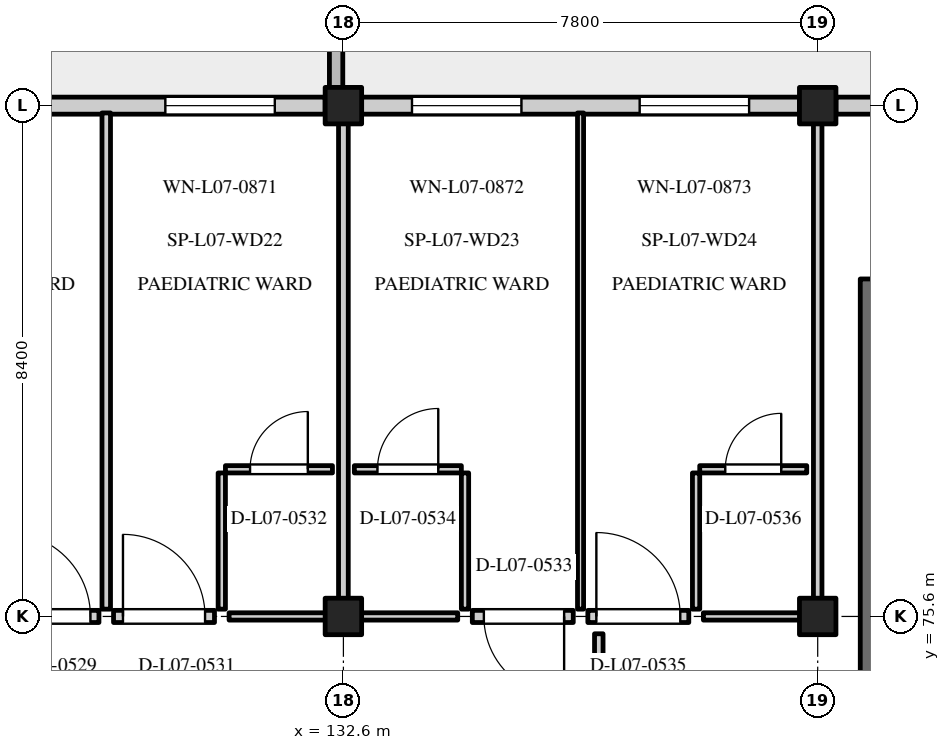
"""IFC4 building model, lengths in metres.
Left out: names, types, materials, properties, quantities, classifications, styles, units other than length and angle.
Written with IfcOpenShell. Run it as: python <this file> out.ifc"""

import sys

from ifc_helpers import new_model, si_unit, direction, frame, frame_2d, origin, origin_2d, place, context, subcontext, project, spatial, rectangle, extrude, element, fill, save


model = new_model("IFC4")
c1 = context("Model", 3, precision=1e-05, world=origin(), true_north=direction((0.0, 1.0)))
c2 = subcontext(c1, "Body", "Model", "MODEL_VIEW")
j1 = project(units=[si_unit("LENGTHUNIT", "METRE"), si_unit("PLANEANGLEUNIT", "RADIAN")], contexts=[c1])
p1 = place(None, origin())
s1 = spatial("IfcSite", under=j1, at=p1, CompositionType="ELEMENT")
p2 = place(p1, origin())
s2 = spatial("IfcBuilding", under=s1, at=p2, CompositionType="ELEMENT")
p3 = place(p2, frame((0.0, 0.0, 29.7)))
s3 = spatial("IfcBuildingStorey", under=s2, at=p3, CompositionType="ELEMENT", Elevation=29.7)
for number, where, z_axis, x_axis in (
    (1, (132.6, 75.6, 0.0), (0.0, 0.0, 1.0), (1.0, 0.0, 0.0)),
    (2, (132.6, 84.0, 0.0), (0.0, 0.0, 1.0), (1.0, 0.0, 0.0)),
    (3, (140.4, 75.6, 0.0), (0.0, 0.0, 1.0), (1.0, 0.0, 0.0)),
    (4, (140.4, 84.0, 0.0), (0.0, 0.0, 1.0), (1.0, 0.0, 0.0)),
):
    element("IfcColumn", number, at=place(p3, frame(where, z_axis=z_axis, x_axis=x_axis)), inside=s3, PredefinedType="COLUMN", context=c2, shape_type="SweptSolid", body=[
        extrude(rectangle(XDim=0.6, YDim=0.6, at=origin_2d()), origin(), (0.0, 0.0, 1.0), 4.2),
    ])
p4 = place(p3, frame((125.1, 84.0, 0.0), z_axis=(0.0, 0.0, 1.0), x_axis=(1.0, 0.0, 0.0)))
e5 = element("IfcWall", 5, at=p4, inside=s3, PredefinedType="STANDARD", context=c2, shape_type="SweptSolid", body=[
    extrude(rectangle(XDim=7.2, YDim=0.28, at=frame_2d((3.6, 0.0))), origin(), (0.0, 0.0, 1.0), 3.25),
])
p5 = place(p4, frame((0.828, 0.0, 0.8)))
e6 = element("IfcOpeningElement", 6, at=p5, cuts=e5, PredefinedType="OPENING", context=c2, shape_type="SweptSolid", body=[
    extrude(rectangle(XDim=1.8, YDim=1.55, at=frame_2d((0.9, 0.775))), frame((0.0, 0.152, 0.0), z_axis=(0.0, -1.0, 0.0), x_axis=(1.0, 0.0, 0.0)), (0.0, 0.0, 1.0), 0.304),
])
p6 = place(p4, frame((4.572, 0.0, 0.8)))
e7 = element("IfcOpeningElement", 7, at=p6, cuts=e5, PredefinedType="OPENING", context=c2, shape_type="SweptSolid", body=[
    extrude(rectangle(XDim=1.8, YDim=1.55, at=frame_2d((0.9, 0.775))), frame((0.0, 0.152, 0.0), z_axis=(0.0, -1.0, 0.0), x_axis=(1.0, 0.0, 0.0)), (0.0, 0.0, 1.0), 0.304),
])
p7 = place(p3, frame((132.9, 84.0, 0.0), z_axis=(0.0, 0.0, 1.0), x_axis=(1.0, 0.0, 0.0)))
e8 = element("IfcWall", 8, at=p7, inside=s3, PredefinedType="STANDARD", context=c2, shape_type="SweptSolid", body=[
    extrude(rectangle(XDim=7.2, YDim=0.28, at=frame_2d((3.6, 0.0))), origin(), (0.0, 0.0, 1.0), 3.25),
])
p8 = place(p7, frame((0.828, 0.0, 0.8)))
e9 = element("IfcOpeningElement", 9, at=p8, cuts=e8, PredefinedType="OPENING", context=c2, shape_type="SweptSolid", body=[
    extrude(rectangle(XDim=1.8, YDim=1.45, at=frame_2d((0.9, 0.725))), frame((0.0, 0.152, 0.0), z_axis=(0.0, -1.0, 0.0), x_axis=(1.0, 0.0, 0.0)), (0.0, 0.0, 1.0), 0.304),
])
p9 = place(p7, frame((4.572, 0.0, 0.8)))
e10 = element("IfcOpeningElement", 10, at=p9, cuts=e8, PredefinedType="OPENING", context=c2, shape_type="SweptSolid", body=[
    extrude(rectangle(XDim=1.8, YDim=1.45, at=frame_2d((0.9, 0.725))), frame((0.0, 0.152, 0.0), z_axis=(0.0, -1.0, 0.0), x_axis=(1.0, 0.0, 0.0)), (0.0, 0.0, 1.0), 0.304),
])
p10 = place(p3, frame((140.7, 84.0, 0.0), z_axis=(0.0, 0.0, 1.0), x_axis=(1.0, 0.0, 0.0)))
e11 = element("IfcWall", 11, at=p10, inside=s3, PredefinedType="STANDARD", context=c2, shape_type="SweptSolid", body=[
    extrude(rectangle(XDim=7.2, YDim=0.28, at=frame_2d((3.6, 0.0))), origin(), (0.0, 0.0, 1.0), 3.25),
])
p11 = place(p10, frame((0.678, 0.0, 0.8)))
e12 = element("IfcOpeningElement", 12, at=p11, cuts=e11, PredefinedType="OPENING", context=c2, shape_type="SweptSolid", body=[
    extrude(rectangle(XDim=2.1, YDim=1.75, at=frame_2d((1.05, 0.875))), frame((0.0, 0.152, 0.0), z_axis=(0.0, -1.0, 0.0), x_axis=(1.0, 0.0, 0.0)), (0.0, 0.0, 1.0), 0.304),
])
p12 = place(p10, frame((4.422, 0.0, 0.8)))
e13 = element("IfcOpeningElement", 13, at=p12, cuts=e11, PredefinedType="OPENING", context=c2, shape_type="SweptSolid", body=[
    extrude(rectangle(XDim=2.1, YDim=1.75, at=frame_2d((1.05, 0.875))), frame((0.0, 0.152, 0.0), z_axis=(0.0, -1.0, 0.0), x_axis=(1.0, 0.0, 0.0)), (0.0, 0.0, 1.0), 0.304),
])
p13 = place(p3, frame((132.48, 84.05, 0.0), z_axis=(0.0, 0.0, 1.0), x_axis=(0.0, 1.0, 0.0)))
e14 = element("IfcWall", 14, at=p13, inside=s3, PredefinedType="PARAPET", context=c2, shape_type="SweptSolid", body=[
    extrude(rectangle(XDim=8.3, YDim=0.22, at=frame_2d((4.15, 0.0))), origin(), (0.0, 0.0, 1.0), 1.15),
])
p14 = place(p3, frame((141.275, 70.65, 0.0), z_axis=(0.0, 0.0, 1.0), x_axis=(0.0, 1.0, 0.0)))
e15 = element("IfcWall", 15, at=p14, inside=s3, PredefinedType="SHEAR", context=c2, shape_type="SweptSolid", body=[
    extrude(rectangle(XDim=10.5, YDim=0.35, at=frame_2d((5.25, 0.0))), origin(), (0.0, 0.0, 1.0), 3.9),
])
p15 = place(p3, frame((128.7, 75.72, 0.0), z_axis=(0.0, 0.0, 1.0), x_axis=(0.0, 1.0, 0.0)))
e16 = element("IfcWall", 16, at=p15, inside=s3, PredefinedType="PARTITIONING", context=c2, shape_type="SweptSolid", body=[
    extrude(rectangle(XDim=8.16, YDim=0.14, at=frame_2d((4.08, 0.0))), origin(), (0.0, 0.0, 1.0), 3.88),
])
p16 = place(p3, frame((126.92, 75.6, 0.0), z_axis=(0.0, 0.0, 1.0), x_axis=(1.0, 0.0, 0.0)))
e17 = element("IfcWall", 17, at=p16, inside=s3, PredefinedType="STANDARD", context=c2, shape_type="SweptSolid", body=[
    extrude(rectangle(XDim=1.66, YDim=0.2, at=frame_2d((0.83, 0.0))), origin(), (0.0, 0.0, 1.0), 3.25),
])
p17 = place(p16, frame((0.14, 0.0, 0.0)))
e18 = element("IfcOpeningElement", 18, at=p17, cuts=e17, PredefinedType="OPENING", context=c2, shape_type="SweptSolid", body=[
    extrude(rectangle(XDim=1.38, YDim=2.2, at=frame_2d((0.69, 1.1))), frame((0.0, 0.112, 0.0), z_axis=(0.0, -1.0, 0.0), x_axis=(1.0, 0.0, 0.0)), (0.0, 0.0, 1.0), 0.224),
])
p18 = place(p3, frame((132.6, 75.72, 0.0), z_axis=(0.0, 0.0, 1.0), x_axis=(0.0, 1.0, 0.0)))
e19 = element("IfcWall", 19, at=p18, inside=s3, PredefinedType="PARTITIONING", context=c2, shape_type="SweptSolid", body=[
    extrude(rectangle(XDim=8.16, YDim=0.16, at=frame_2d((4.08, 0.0))), origin(), (0.0, 0.0, 1.0), 3.25),
])
p19 = place(p3, frame((128.82, 75.6, 0.0), z_axis=(0.0, 0.0, 1.0), x_axis=(1.0, 0.0, 0.0)))
e20 = element("IfcWall", 20, at=p19, inside=s3, PredefinedType="STANDARD", context=c2, shape_type="SweptSolid", body=[
    extrude(rectangle(XDim=1.66, YDim=0.2, at=frame_2d((0.83, 0.0))), origin(), (0.0, 0.0, 1.0), 3.25),
])
p20 = place(p19, frame((0.155, 0.0, 0.0)))
e21 = element("IfcOpeningElement", 21, at=p20, cuts=e20, PredefinedType="OPENING", context=c2, shape_type="SweptSolid", body=[
    extrude(rectangle(XDim=1.35, YDim=2.15, at=frame_2d((0.675, 1.075))), frame((0.0, 0.112, 0.0), z_axis=(0.0, -1.0, 0.0), x_axis=(1.0, 0.0, 0.0)), (0.0, 0.0, 1.0), 0.224),
])
p21 = place(p3, frame((130.72, 75.6, 0.0), z_axis=(0.0, 0.0, 1.0), x_axis=(1.0, 0.0, 0.0)))
e22 = element("IfcWall", 22, at=p21, inside=s3, PredefinedType="PARTITIONING", context=c2, shape_type="SweptSolid", body=[
    extrude(rectangle(XDim=1.76, YDim=0.12, at=frame_2d((0.88, 0.0))), origin(), (0.0, 0.0, 1.0), 3.25),
])
p22 = place(p3, frame((130.6, 75.72, 0.0), z_axis=(0.0, 0.0, 1.0), x_axis=(0.0, 1.0, 0.0)))
e23 = element("IfcWall", 23, at=p22, inside=s3, PredefinedType="PARTITIONING", context=c2, shape_type="SweptSolid", body=[
    extrude(rectangle(XDim=2.24, YDim=0.12, at=frame_2d((1.12, 0.0))), origin(), (0.0, 0.0, 1.0), 3.88),
])
p23 = place(p3, frame((130.66, 78.02, 0.0), z_axis=(0.0, 0.0, 1.0), x_axis=(1.0, 0.0, 0.0)))
e24 = element("IfcWall", 24, at=p23, inside=s3, PredefinedType="PARTITIONING", context=c2, shape_type="SweptSolid", body=[
    extrude(rectangle(XDim=1.76, YDim=0.12, at=frame_2d((0.88, 0.0))), origin(), (0.0, 0.0, 1.0), 3.88),
])
p24 = place(p23, frame((0.405, 0.0, 0.0)))
e25 = element("IfcOpeningElement", 25, at=p24, cuts=e24, PredefinedType="OPENING", context=c2, shape_type="SweptSolid", body=[
    extrude(rectangle(XDim=0.95, YDim=2.1, at=frame_2d((0.475, 1.05))), frame((0.0, 0.072, 0.0), z_axis=(0.0, -1.0, 0.0), x_axis=(1.0, 0.0, 0.0)), (0.0, 0.0, 1.0), 0.144),
])
p25 = place(p3, frame((136.5, 75.72, 0.0), z_axis=(0.0, 0.0, 1.0), x_axis=(0.0, 1.0, 0.0)))
e26 = element("IfcWall", 26, at=p25, inside=s3, PredefinedType="PARTITIONING", context=c2, shape_type="SweptSolid", body=[
    extrude(rectangle(XDim=8.16, YDim=0.1, at=frame_2d((4.08, 0.0))), origin(), (0.0, 0.0, 1.0), 3.88),
])
p26 = place(p3, frame((134.72, 75.6, 0.0), z_axis=(0.0, 0.0, 1.0), x_axis=(1.0, 0.0, 0.0)))
e27 = element("IfcWall", 27, at=p26, inside=s3, PredefinedType="STANDARD", context=c2, shape_type="SweptSolid", body=[
    extrude(rectangle(XDim=1.66, YDim=0.2, at=frame_2d((0.83, 0.0))), origin(), (0.0, 0.0, 1.0), 3.25),
])
p27 = place(p26, frame((0.19, 0.0, 0.0)))
e28 = element("IfcOpeningElement", 28, at=p27, cuts=e27, PredefinedType="OPENING", context=c2, shape_type="SweptSolid", body=[
    extrude(rectangle(XDim=1.32, YDim=2.2, at=frame_2d((0.66, 1.1))), frame((0.0, 0.112, 0.0), z_axis=(0.0, -1.0, 0.0), x_axis=(1.0, 0.0, 0.0)), (0.0, 0.0, 1.0), 0.224),
])
p28 = place(p3, frame((132.72, 75.6, 0.0), z_axis=(0.0, 0.0, 1.0), x_axis=(1.0, 0.0, 0.0)))
e29 = element("IfcWall", 29, at=p28, inside=s3, PredefinedType="PARTITIONING", context=c2, shape_type="SweptSolid", body=[
    extrude(rectangle(XDim=1.76, YDim=0.12, at=frame_2d((0.88, 0.0))), origin(), (0.0, 0.0, 1.0), 3.25),
])
p29 = place(p3, frame((134.6, 75.72, 0.0), z_axis=(0.0, 0.0, 1.0), x_axis=(0.0, 1.0, 0.0)))
e30 = element("IfcWall", 30, at=p29, inside=s3, PredefinedType="PARTITIONING", context=c2, shape_type="SweptSolid", body=[
    extrude(rectangle(XDim=2.24, YDim=0.12, at=frame_2d((1.12, 0.0))), origin(), (0.0, 0.0, 1.0), 3.88),
])
p30 = place(p3, frame((132.78, 78.02, 0.0), z_axis=(0.0, 0.0, 1.0), x_axis=(1.0, 0.0, 0.0)))
e31 = element("IfcWall", 31, at=p30, inside=s3, PredefinedType="PARTITIONING", context=c2, shape_type="SweptSolid", body=[
    extrude(rectangle(XDim=1.76, YDim=0.12, at=frame_2d((0.88, 0.0))), origin(), (0.0, 0.0, 1.0), 3.88),
])
p31 = place(p30, frame((0.38, 0.0, 0.0)))
e32 = element("IfcOpeningElement", 32, at=p31, cuts=e31, PredefinedType="OPENING", context=c2, shape_type="SweptSolid", body=[
    extrude(rectangle(XDim=1.0, YDim=2.1, at=frame_2d((0.5, 1.05))), frame((0.0, 0.072, 0.0), z_axis=(0.0, -1.0, 0.0), x_axis=(1.0, 0.0, 0.0)), (0.0, 0.0, 1.0), 0.144),
])
p32 = place(p3, frame((140.4, 75.72, 0.0), z_axis=(0.0, 0.0, 1.0), x_axis=(0.0, 1.0, 0.0)))
e33 = element("IfcWall", 33, at=p32, inside=s3, PredefinedType="PARTITIONING", context=c2, shape_type="SweptSolid", body=[
    extrude(rectangle(XDim=8.16, YDim=0.14, at=frame_2d((4.08, 0.0))), origin(), (0.0, 0.0, 1.0), 3.88),
])
p33 = place(p3, frame((136.62, 75.6, 0.0), z_axis=(0.0, 0.0, 1.0), x_axis=(1.0, 0.0, 0.0)))
e34 = element("IfcWall", 34, at=p33, inside=s3, PredefinedType="STANDARD", context=c2, shape_type="SweptSolid", body=[
    extrude(rectangle(XDim=1.66, YDim=0.2, at=frame_2d((0.83, 0.0))), origin(), (0.0, 0.0, 1.0), 3.25),
])
p34 = place(p33, frame((0.14, 0.0, 0.0)))
e35 = element("IfcOpeningElement", 35, at=p34, cuts=e34, PredefinedType="OPENING", context=c2, shape_type="SweptSolid", body=[
    extrude(rectangle(XDim=1.38, YDim=2.2, at=frame_2d((0.69, 1.1))), frame((0.0, 0.112, 0.0), z_axis=(0.0, -1.0, 0.0), x_axis=(1.0, 0.0, 0.0)), (0.0, 0.0, 1.0), 0.224),
])
p35 = place(p3, frame((138.52, 75.6, 0.0), z_axis=(0.0, 0.0, 1.0), x_axis=(1.0, 0.0, 0.0)))
e36 = element("IfcWall", 36, at=p35, inside=s3, PredefinedType="PARTITIONING", context=c2, shape_type="SweptSolid", body=[
    extrude(rectangle(XDim=1.76, YDim=0.12, at=frame_2d((0.88, 0.0))), origin(), (0.0, 0.0, 1.0), 3.25),
])
p36 = place(p3, frame((138.4, 75.72, 0.0), z_axis=(0.0, 0.0, 1.0), x_axis=(0.0, 1.0, 0.0)))
e37 = element("IfcWall", 37, at=p36, inside=s3, PredefinedType="PARTITIONING", context=c2, shape_type="SweptSolid", body=[
    extrude(rectangle(XDim=2.24, YDim=0.12, at=frame_2d((1.12, 0.0))), origin(), (0.0, 0.0, 1.0), 3.88),
])
p37 = place(p3, frame((138.46, 78.02, 0.0), z_axis=(0.0, 0.0, 1.0), x_axis=(1.0, 0.0, 0.0)))
e38 = element("IfcWall", 38, at=p37, inside=s3, PredefinedType="PARTITIONING", context=c2, shape_type="SweptSolid", body=[
    extrude(rectangle(XDim=1.76, YDim=0.12, at=frame_2d((0.88, 0.0))), origin(), (0.0, 0.0, 1.0), 3.88),
])
p38 = place(p37, frame((0.42, 0.0, 0.0)))
e39 = element("IfcOpeningElement", 39, at=p38, cuts=e38, PredefinedType="OPENING", context=c2, shape_type="SweptSolid", body=[
    extrude(rectangle(XDim=0.92, YDim=2.08, at=frame_2d((0.46, 1.04))), frame((0.0, 0.072, 0.0), z_axis=(0.0, -1.0, 0.0), x_axis=(1.0, 0.0, 0.0)), (0.0, 0.0, 1.0), 0.144),
])
p39 = place(p3, frame((136.8, 72.085, 0.0), z_axis=(0.0, 0.0, 1.0), x_axis=(0.0, 1.0, 0.0)))
e40 = element("IfcWall", 40, at=p39, inside=s3, PredefinedType="PARTITIONING", context=c2, shape_type="SweptSolid", body=[
    extrude(rectangle(XDim=3.23, YDim=0.14, at=frame_2d((1.615, 0.0))), origin(), (0.0, 0.0, 1.0), 3.88),
])
p40 = place(p6, origin())
e41 = element("IfcWindow", 41, at=p40, inside=s3, PartitioningType="DOUBLE_PANEL_VERTICAL", PredefinedType="WINDOW", context=c2, shape_type="SweptSolid", body=[
    extrude(rectangle(XDim=1.8, YDim=1.55, at=frame_2d((0.9, 0.775))), frame((0.0, 0.03, 0.0), z_axis=(0.0, -1.0, 0.0), x_axis=(1.0, 0.0, 0.0)), (0.0, 0.0, 1.0), 0.06),
])
fill(e7, e41)
p41 = place(p8, origin())
e42 = element("IfcWindow", 42, at=p41, inside=s3, PartitioningType="DOUBLE_PANEL_VERTICAL", PredefinedType="WINDOW", context=c2, shape_type="SweptSolid", body=[
    extrude(rectangle(XDim=1.8, YDim=1.45, at=frame_2d((0.9, 0.725))), frame((0.0, 0.03, 0.0), z_axis=(0.0, -1.0, 0.0), x_axis=(1.0, 0.0, 0.0)), (0.0, 0.0, 1.0), 0.06),
])
fill(e9, e42)
p42 = place(p9, origin())
e43 = element("IfcWindow", 43, at=p42, inside=s3, PartitioningType="DOUBLE_PANEL_VERTICAL", PredefinedType="WINDOW", context=c2, shape_type="SweptSolid", body=[
    extrude(rectangle(XDim=1.8, YDim=1.45, at=frame_2d((0.9, 0.725))), frame((0.0, 0.03, 0.0), z_axis=(0.0, -1.0, 0.0), x_axis=(1.0, 0.0, 0.0)), (0.0, 0.0, 1.0), 0.06),
])
fill(e10, e43)
p43 = place(p17, origin())
e44 = element("IfcDoor", 44, at=p43, inside=s3, OperationType="SINGLE_SWING_LEFT", PredefinedType="DOOR", context=c2, shape_type="SweptSolid", body=[
    extrude(rectangle(XDim=1.38, YDim=2.2, at=frame_2d((0.69, 1.1))), frame((0.0, 0.025, 0.0), z_axis=(0.0, -1.0, 0.0), x_axis=(1.0, 0.0, 0.0)), (0.0, 0.0, 1.0), 0.05),
])
fill(e18, e44)
p44 = place(p20, origin())
e45 = element("IfcDoor", 45, at=p44, inside=s3, OperationType="SINGLE_SWING_LEFT", PredefinedType="DOOR", context=c2, shape_type="SweptSolid", body=[
    extrude(rectangle(XDim=1.35, YDim=2.15, at=frame_2d((0.675, 1.075))), frame((0.0, 0.025, 0.0), z_axis=(0.0, -1.0, 0.0), x_axis=(1.0, 0.0, 0.0)), (0.0, 0.0, 1.0), 0.05),
])
fill(e21, e45)
p45 = place(p24, frame((0.95, 0.0, 0.0), z_axis=(0.0, 0.0, 1.0), x_axis=(-1.0, 0.0, 0.0)))
e46 = element("IfcDoor", 46, at=p45, inside=s3, OperationType="SINGLE_SWING_LEFT", PredefinedType="DOOR", context=c2, shape_type="SweptSolid", body=[
    extrude(rectangle(XDim=0.95, YDim=2.1, at=frame_2d((0.475, 1.05))), frame((0.0, 0.025, 0.0), z_axis=(0.0, -1.0, 0.0), x_axis=(1.0, 0.0, 0.0)), (0.0, 0.0, 1.0), 0.05),
])
fill(e25, e46)
p46 = place(p27, origin())
e47 = element("IfcDoor", 47, at=p46, inside=s3, OperationType="SINGLE_SWING_RIGHT", PredefinedType="DOOR", context=c2, shape_type="SweptSolid", body=[
    extrude(rectangle(XDim=1.32, YDim=2.2, at=frame_2d((0.66, 1.1))), frame((0.0, 0.025, 0.0), z_axis=(0.0, -1.0, 0.0), x_axis=(1.0, 0.0, 0.0)), (0.0, 0.0, 1.0), 0.05),
])
fill(e28, e47)
p47 = place(p31, frame((1.0, 0.0, 0.0), z_axis=(0.0, 0.0, 1.0), x_axis=(-1.0, 0.0, 0.0)))
e48 = element("IfcDoor", 48, at=p47, inside=s3, OperationType="SINGLE_SWING_LEFT", PredefinedType="DOOR", context=c2, shape_type="SweptSolid", body=[
    extrude(rectangle(XDim=1.0, YDim=2.1, at=frame_2d((0.5, 1.05))), frame((0.0, 0.025, 0.0), z_axis=(0.0, -1.0, 0.0), x_axis=(1.0, 0.0, 0.0)), (0.0, 0.0, 1.0), 0.05),
])
fill(e32, e48)
p48 = place(p34, origin())
e49 = element("IfcDoor", 49, at=p48, inside=s3, OperationType="SINGLE_SWING_LEFT", PredefinedType="DOOR", context=c2, shape_type="SweptSolid", body=[
    extrude(rectangle(XDim=1.38, YDim=2.2, at=frame_2d((0.69, 1.1))), frame((0.0, 0.025, 0.0), z_axis=(0.0, -1.0, 0.0), x_axis=(1.0, 0.0, 0.0)), (0.0, 0.0, 1.0), 0.05),
])
fill(e35, e49)
p49 = place(p38, frame((0.92, 0.0, 0.0), z_axis=(0.0, 0.0, 1.0), x_axis=(-1.0, 0.0, 0.0)))
e50 = element("IfcDoor", 50, at=p49, inside=s3, OperationType="SINGLE_SWING_LEFT", PredefinedType="DOOR", context=c2, shape_type="SweptSolid", body=[
    extrude(rectangle(XDim=0.92, YDim=2.08, at=frame_2d((0.46, 1.04))), frame((0.0, 0.025, 0.0), z_axis=(0.0, -1.0, 0.0), x_axis=(1.0, 0.0, 0.0)), (0.0, 0.0, 1.0), 0.05),
])
fill(e39, e50)
save(model, sys.argv[1])
